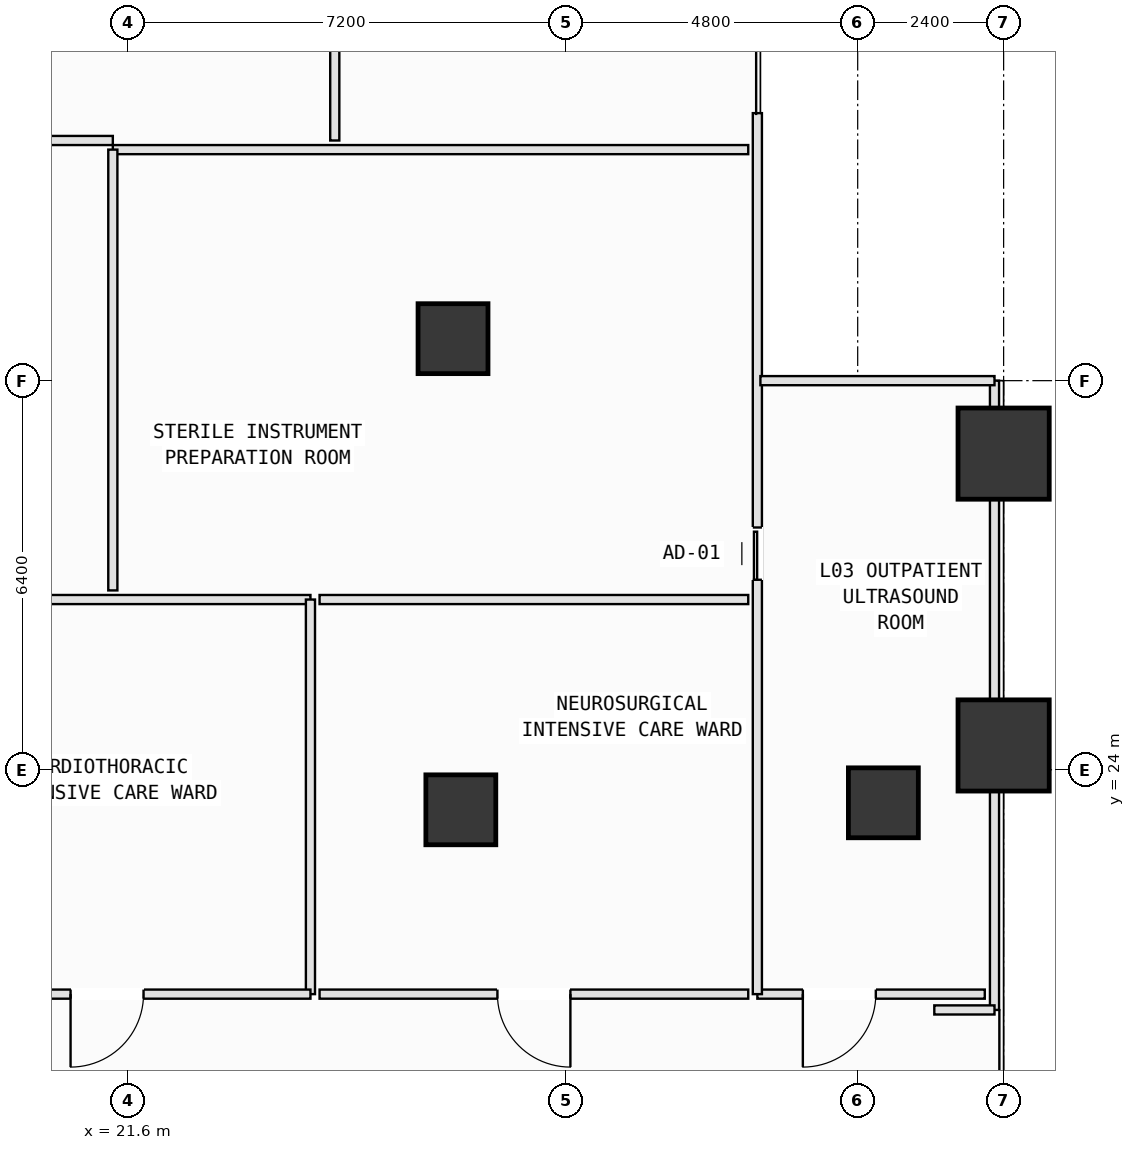
"""IFC4 building model, lengths in metres.
Left out: names, types, materials, properties, quantities, classifications, styles, units other than length and angle.
Written with IfcOpenShell. Run it as: python <this file> out.ifc"""

import sys

from ifc_helpers import new_model, si_unit, direction, frame, frame_2d, origin, origin_2d, place, context, subcontext, project, spatial, rectangle, extrude, element, fill, save


model = new_model("IFC4")
c1 = context("Model", 3, precision=1e-05, world=origin(), true_north=direction((0.0, 1.0)))
c2 = subcontext(c1, "Body", "Model", "MODEL_VIEW")
j1 = project(units=[si_unit("LENGTHUNIT", "METRE"), si_unit("PLANEANGLEUNIT", "RADIAN")], contexts=[c1])
p1 = place(None, origin())
s1 = spatial("IfcSite", under=j1, at=p1, CompositionType="ELEMENT")
p2 = place(p1, origin())
s2 = spatial("IfcBuilding", under=s1, at=p2, CompositionType="ELEMENT")
p3 = place(p2, frame((0.0, 0.0, 16.2)))
s3 = spatial("IfcBuildingStorey", under=s2, at=p3, CompositionType="ELEMENT", Elevation=16.2)
for number, where, z_axis, x_axis in (
    (1, (36.0, 24.4, 0.0), (0.0, 0.0, 1.0), (1.0, 0.0, 0.0)),
    (2, (36.0, 29.2, 0.0), (0.0, 0.0, 1.0), (1.0, 0.0, 0.0)),
):
    element("IfcColumn", number, at=place(p3, frame(where, z_axis=z_axis, x_axis=x_axis)), inside=s3, PredefinedType="PILASTER", context=c2, shape_type="SweptSolid", body=[
        extrude(rectangle(XDim=1.5, YDim=1.5, at=origin_2d()), origin(), (0.0, 0.0, 1.0), 5.4),
    ])
for number, where, z_axis, x_axis in (
    (3, (34.022, 23.457, 0.0), (0.0, 0.0, 1.0), (1.0, 0.0, 0.0)),
    (4, (27.073, 23.342, 0.0), (0.0, 0.0, 1.0), (1.0, 0.0, 0.0)),
    (5, (26.945, 31.091, 0.0), (0.0, 0.0, 1.0), (1.0, 0.0, 0.0)),
):
    element("IfcColumn", number, at=place(p3, frame(where, z_axis=z_axis, x_axis=x_axis)), inside=s3, PredefinedType="COLUMN", context=c2, shape_type="SweptSolid", body=[
        extrude(rectangle(XDim=1.15, YDim=1.15, at=origin_2d()), origin(), (0.0, 0.0, 1.0), 5.4),
    ])
p4 = place(p3, frame((35.85, 30.4, 0.0), z_axis=(0.0, 0.0, 1.0), x_axis=(0.0, -1.0, 0.0)))
e6 = element("IfcWall", 6, at=p4, inside=s3, PredefinedType="PARTITIONING", context=c2, shape_type="SweptSolid", body=[
    extrude(rectangle(XDim=10.35, YDim=0.15, at=frame_2d((5.175, 0.0))), origin(), (0.0, 0.0, 1.0), 4.235),
])
p5 = place(p3, frame((35.85, 20.05, 0.0), z_axis=(0.0, 0.0, 1.0), x_axis=(-1.0, 0.0, 0.0)))
e7 = element("IfcWall", 7, at=p5, inside=s3, PredefinedType="PARTITIONING", context=c2, shape_type="SweptSolid", body=[
    extrude(rectangle(XDim=0.99, YDim=0.15, at=frame_2d((0.495, 0.0))), origin(), (0.0, 0.0, 1.0), 5.15),
])
p6 = place(p3, frame((35.69, 20.31, 0.0), z_axis=(0.0, 0.0, 1.0), x_axis=(-1.0, 0.0, 0.0)))
e8 = element("IfcWall", 8, at=p6, inside=s3, PredefinedType="PARTITIONING", context=c2, shape_type="SweptSolid", body=[
    extrude(rectangle(XDim=3.74, YDim=0.15, at=frame_2d((1.87, 0.0))), origin(), (0.0, 0.0, 1.0), 5.15),
])
p7 = place(p6, frame((1.792, 0.0, 0.0)))
e9 = element("IfcOpeningElement", 9, at=p7, cuts=e8, PredefinedType="OPENING", context=c2, shape_type="SweptSolid", body=[
    extrude(rectangle(XDim=1.2, YDim=2.15, at=frame_2d((0.6, 1.075))), frame((0.0, 0.085, 0.0), z_axis=(0.0, -1.0, 0.0), x_axis=(1.0, 0.0, 0.0)), (0.0, 0.0, 1.0), 0.17),
])
p8 = place(p3, frame((31.95, 20.31, 0.0), z_axis=(0.0, 0.0, 1.0), x_axis=(0.0, 1.0, 0.0)))
e10 = element("IfcWall", 10, at=p8, inside=s3, PredefinedType="PARTITIONING", context=c2, shape_type="SweptSolid", body=[
    extrude(rectangle(XDim=14.49, YDim=0.15, at=frame_2d((7.245, 0.0))), origin(), (0.0, 0.0, 1.0), 5.15),
])
p9 = place(p8, frame((6.815, 0.0, 0.0)))
e11 = element("IfcOpeningElement", 11, at=p9, cuts=e10, PredefinedType="OPENING", context=c2, shape_type="SweptSolid", body=[
    extrude(rectangle(XDim=0.86, YDim=2.06, at=frame_2d((0.43, 1.03))), frame((0.0, 0.085, 0.0), z_axis=(0.0, -1.0, 0.0), x_axis=(1.0, 0.0, 0.0)), (0.0, 0.0, 1.0), 0.17),
])
p10 = place(p3, frame((32.0, 30.4, 0.0), z_axis=(0.0, 0.0, 1.0), x_axis=(1.0, 0.0, 0.0)))
e12 = element("IfcWall", 12, at=p10, inside=s3, PredefinedType="PARTITIONING", context=c2, shape_type="SweptSolid", body=[
    extrude(rectangle(XDim=3.85, YDim=0.15, at=frame_2d((1.925, 0.0))), origin(), (0.0, 0.0, 1.0), 4.235),
])
p11 = place(p3, frame((17.91, 26.8, 0.0), z_axis=(0.0, 0.0, 1.0), x_axis=(1.0, 0.0, 0.0)))
e13 = element("IfcWall", 13, at=p11, inside=s3, PredefinedType="PARTITIONING", context=c2, shape_type="SweptSolid", body=[
    extrude(rectangle(XDim=6.69, YDim=0.15, at=frame_2d((3.345, 0.0))), origin(), (0.0, 0.0, 1.0), 5.15),
])
p12 = place(p3, frame((24.6, 26.8, 0.0), z_axis=(0.0, 0.0, 1.0), x_axis=(0.0, -1.0, 0.0)))
e14 = element("IfcWall", 14, at=p12, inside=s3, PredefinedType="PARTITIONING", context=c2, shape_type="SweptSolid", body=[
    extrude(rectangle(XDim=6.49, YDim=0.15, at=frame_2d((3.245, 0.0))), origin(), (0.0, 0.0, 1.0), 5.15),
])
p13 = place(p3, frame((24.6, 20.31, 0.0), z_axis=(0.0, 0.0, 1.0), x_axis=(-1.0, 0.0, 0.0)))
e15 = element("IfcWall", 15, at=p13, inside=s3, PredefinedType="PARTITIONING", context=c2, shape_type="SweptSolid", body=[
    extrude(rectangle(XDim=6.69, YDim=0.15, at=frame_2d((3.345, 0.0))), origin(), (0.0, 0.0, 1.0), 5.15),
])
p14 = place(p13, frame((2.745, 0.0, 0.0)))
e16 = element("IfcOpeningElement", 16, at=p14, cuts=e15, PredefinedType="OPENING", context=c2, shape_type="SweptSolid", body=[
    extrude(rectangle(XDim=1.2, YDim=2.15, at=frame_2d((0.6, 1.075))), frame((0.0, 0.085, 0.0), z_axis=(0.0, -1.0, 0.0), x_axis=(1.0, 0.0, 0.0)), (0.0, 0.0, 1.0), 0.17),
])
p15 = place(p3, frame((24.75, 26.8, 0.0), z_axis=(0.0, 0.0, 1.0), x_axis=(1.0, 0.0, 0.0)))
e17 = element("IfcWall", 17, at=p15, inside=s3, PredefinedType="PARTITIONING", context=c2, shape_type="SweptSolid", body=[
    extrude(rectangle(XDim=7.05, YDim=0.15, at=frame_2d((3.525, 0.0))), origin(), (0.0, 0.0, 1.0), 5.15),
])
p16 = place(p3, frame((31.8, 20.31, 0.0), z_axis=(0.0, 0.0, 1.0), x_axis=(-1.0, 0.0, 0.0)))
e18 = element("IfcWall", 18, at=p16, inside=s3, PredefinedType="PARTITIONING", context=c2, shape_type="SweptSolid", body=[
    extrude(rectangle(XDim=7.05, YDim=0.15, at=frame_2d((3.525, 0.0))), origin(), (0.0, 0.0, 1.0), 5.15),
])
p17 = place(p16, frame((2.925, 0.0, 0.0)))
e19 = element("IfcOpeningElement", 19, at=p17, cuts=e18, PredefinedType="OPENING", context=c2, shape_type="SweptSolid", body=[
    extrude(rectangle(XDim=1.2, YDim=2.15, at=frame_2d((0.6, 1.075))), frame((0.0, 0.085, 0.0), z_axis=(0.0, -1.0, 0.0), x_axis=(1.0, 0.0, 0.0)), (0.0, 0.0, 1.0), 0.17),
])
p18 = place(p3, frame((21.35, 34.2, 0.0), z_axis=(0.0, 0.0, 1.0), x_axis=(1.0, 0.0, 0.0)))
e20 = element("IfcWall", 20, at=p18, inside=s3, PredefinedType="PARTITIONING", context=c2, shape_type="SweptSolid", body=[
    extrude(rectangle(XDim=10.45, YDim=0.15, at=frame_2d((5.225, 0.0))), origin(), (0.0, 0.0, 1.0), 5.15),
])
p19 = place(p3, frame((21.35, 26.95, 0.0), z_axis=(0.0, 0.0, 1.0), x_axis=(0.0, 1.0, 0.0)))
e21 = element("IfcWall", 21, at=p19, inside=s3, PredefinedType="PARTITIONING", context=c2, shape_type="SweptSolid", body=[
    extrude(rectangle(XDim=7.25, YDim=0.15, at=frame_2d((3.625, 0.0))), origin(), (0.0, 0.0, 1.0), 5.15),
])
p20 = place(p3, frame((25.0, 41.5, 0.0), z_axis=(0.0, 0.0, 1.0), x_axis=(0.0, -1.0, 0.0)))
e22 = element("IfcWall", 22, at=p20, inside=s3, PredefinedType="PARTITIONING", context=c2, shape_type="SweptSolid", body=[
    extrude(rectangle(XDim=7.15, YDim=0.15, at=frame_2d((3.575, 0.0))), origin(), (0.0, 0.0, 1.0), 5.15),
])
p21 = place(p3, frame((21.35, 34.35, 0.0), z_axis=(0.0, 0.0, 1.0), x_axis=(-1.0, 0.0, 0.0)))
e23 = element("IfcWall", 23, at=p21, inside=s3, PredefinedType="PARTITIONING", context=c2, shape_type="SweptSolid", body=[
    extrude(rectangle(XDim=3.2, YDim=0.15, at=frame_2d((1.6, 0.0))), origin(), (0.0, 0.0, 1.0), 5.15),
])
p22 = place(p7, origin())
e24 = element("IfcDoor", 24, at=p22, inside=s3, OperationType="SINGLE_SWING_RIGHT", PredefinedType="DOOR", context=c2, shape_type="SweptSolid", body=[
    extrude(rectangle(XDim=1.2, YDim=2.15, at=frame_2d((0.6, 1.075))), frame((0.0, 0.025, 0.0), z_axis=(0.0, -1.0, 0.0), x_axis=(1.0, 0.0, 0.0)), (0.0, 0.0, 1.0), 0.05),
])
fill(e9, e24)
p23 = place(p14, origin())
e25 = element("IfcDoor", 25, at=p23, inside=s3, OperationType="SINGLE_SWING_RIGHT", PredefinedType="DOOR", context=c2, shape_type="SweptSolid", body=[
    extrude(rectangle(XDim=1.2, YDim=2.15, at=frame_2d((0.6, 1.075))), frame((0.0, 0.025, 0.0), z_axis=(0.0, -1.0, 0.0), x_axis=(1.0, 0.0, 0.0)), (0.0, 0.0, 1.0), 0.05),
])
fill(e16, e25)
p24 = place(p17, origin())
e26 = element("IfcDoor", 26, at=p24, inside=s3, OperationType="SINGLE_SWING_LEFT", PredefinedType="DOOR", context=c2, shape_type="SweptSolid", body=[
    extrude(rectangle(XDim=1.2, YDim=2.15, at=frame_2d((0.6, 1.075))), frame((0.0, 0.025, 0.0), z_axis=(0.0, -1.0, 0.0), x_axis=(1.0, 0.0, 0.0)), (0.0, 0.0, 1.0), 0.05),
])
fill(e19, e26)
p25 = place(p9, origin())
e27 = element("IfcDoor", 27, at=p25, inside=s3, OperationType="SLIDING_TO_LEFT", PredefinedType="DOOR", context=c2, shape_type="SweptSolid", body=[
    extrude(rectangle(XDim=0.86, YDim=2.06, at=frame_2d((0.43, 1.03))), frame((0.0, 0.025, 0.0), z_axis=(0.0, -1.0, 0.0), x_axis=(1.0, 0.0, 0.0)), (0.0, 0.0, 1.0), 0.05),
])
fill(e11, e27)
save(model, sys.argv[1])
